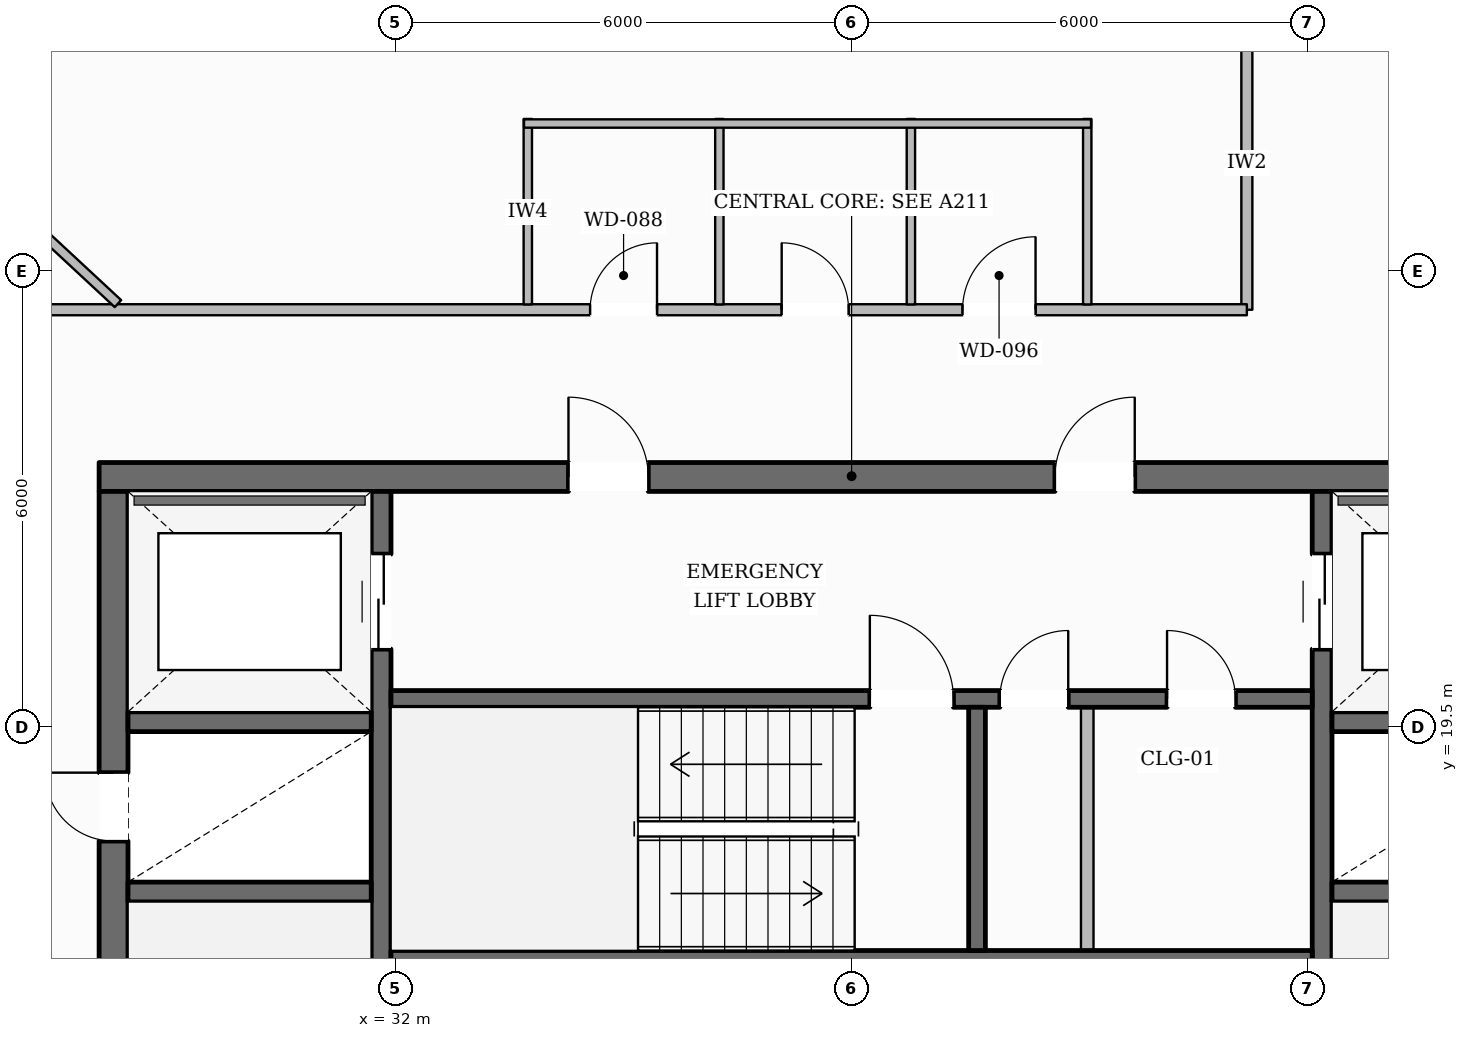
"""IFC4 building model, lengths in metres.
Left out: names, types, materials, properties, quantities, classifications, styles, units other than length and angle.
Written with IfcOpenShell. Run it as: python <this file> out.ifc"""

import sys

from ifc_helpers import new_model, si_unit, direction, frame, frame_2d, origin, place, context, subcontext, project, spatial, rectangle, extrude, element, fill, save


model = new_model("IFC4")
c1 = context("Model", 3, precision=1e-05, world=origin(), true_north=direction((0.0, 1.0)))
c2 = subcontext(c1, "Body", "Model", "MODEL_VIEW")
j1 = project(units=[si_unit("LENGTHUNIT", "METRE"), si_unit("PLANEANGLEUNIT", "RADIAN")], contexts=[c1])
p1 = place(None, origin())
s1 = spatial("IfcSite", under=j1, at=p1, CompositionType="ELEMENT")
p2 = place(p1, origin())
s2 = spatial("IfcBuilding", under=s1, at=p2, CompositionType="ELEMENT")
p3 = place(p2, frame((0.0, 0.0, 301.1)))
s3 = spatial("IfcBuildingStorey", under=s2, at=p3, CompositionType="ELEMENT", Elevation=301.1)
p4 = place(p3, frame((28.1, 22.79, 0.0), z_axis=(0.0, 0.0, 1.0), x_axis=(1.0, 0.0, 0.0)))
e1 = element("IfcWall", 1, at=p4, inside=s3, PredefinedType="SOLIDWALL", context=c2, shape_type="SweptSolid", body=[
    extrude(rectangle(XDim=19.8, YDim=0.38, at=frame_2d((9.9, 0.0))), origin(), (0.0, 0.0, 1.0), 3.635),
])
p5 = place(p4, frame((6.175, 0.0, 0.0)))
e2 = element("IfcOpeningElement", 2, at=p5, cuts=e1, PredefinedType="OPENING", context=c2, shape_type="SweptSolid", body=[
    extrude(rectangle(XDim=1.05, YDim=2.15, at=frame_2d((0.525, 1.075))), frame((0.0, 0.2, 0.0), z_axis=(0.0, -1.0, 0.0), x_axis=(1.0, 0.0, 0.0)), (0.0, 0.0, 1.0), 0.4),
])
p6 = place(p4, frame((12.575, 0.0, 0.0)))
e3 = element("IfcOpeningElement", 3, at=p6, cuts=e1, PredefinedType="OPENING", context=c2, shape_type="SweptSolid", body=[
    extrude(rectangle(XDim=1.05, YDim=2.15, at=frame_2d((0.525, 1.075))), frame((0.0, 0.2, 0.0), z_axis=(0.0, -1.0, 0.0), x_axis=(1.0, 0.0, 0.0)), (0.0, 0.0, 1.0), 0.4),
])
p7 = place(p3, frame((28.29, 9.6, 0.0), z_axis=(0.0, 0.0, 1.0), x_axis=(0.0, 1.0, 0.0)))
e4 = element("IfcWall", 4, at=p7, inside=s3, PredefinedType="SOLIDWALL", context=c2, shape_type="SweptSolid", body=[
    extrude(rectangle(XDim=13.0, YDim=0.38, at=frame_2d((6.5, 0.0))), origin(), (0.0, 0.0, 1.0), 3.635),
])
p8 = place(p7, frame((0.2, 0.0, 0.0)))
e5 = element("IfcOpeningElement", 5, at=p8, cuts=e4, PredefinedType="OPENING", context=c2, shape_type="SweptSolid", body=[
    extrude(rectangle(XDim=1.1, YDim=2.15, at=frame_2d((0.55, 1.075))), frame((0.0, 0.2, 0.0), z_axis=(0.0, -1.0, 0.0), x_axis=(1.0, 0.0, 0.0)), (0.0, 0.0, 1.0), 0.4),
])
p9 = place(p7, frame((8.4, 0.0, 0.0)))
e6 = element("IfcOpeningElement", 6, at=p9, cuts=e4, PredefinedType="OPENING", context=c2, shape_type="SweptSolid", body=[
    extrude(rectangle(XDim=0.9, YDim=2.1, at=frame_2d((0.45, 1.05))), frame((0.0, 0.2, 0.0), z_axis=(0.0, -1.0, 0.0), x_axis=(1.0, 0.0, 0.0)), (0.0, 0.0, 1.0), 0.4),
])
p10 = place(p3, frame((31.81, 9.6, 0.0), z_axis=(0.0, 0.0, 1.0), x_axis=(0.0, 1.0, 0.0)))
e7 = element("IfcWall", 7, at=p10, inside=s3, PredefinedType="SHEAR", context=c2, shape_type="SweptSolid", body=[
    extrude(rectangle(XDim=13.0, YDim=0.26, at=frame_2d((6.5, 0.0))), origin(), (0.0, 0.0, 1.0), 3.635),
])
p11 = place(p10, frame((10.925, 0.0, 0.0)))
e8 = element("IfcOpeningElement", 8, at=p11, cuts=e7, PredefinedType="OPENING", context=c2, shape_type="SweptSolid", body=[
    extrude(rectangle(XDim=1.25, YDim=2.25, at=frame_2d((0.625, 1.125))), frame((0.0, 0.14, 0.0), z_axis=(0.0, -1.0, 0.0), x_axis=(1.0, 0.0, 0.0)), (0.0, 0.0, 1.0), 0.28),
])
p12 = place(p3, frame((44.19, 9.6, 0.0), z_axis=(0.0, 0.0, 1.0), x_axis=(0.0, 1.0, 0.0)))
e9 = element("IfcWall", 9, at=p12, inside=s3, PredefinedType="SHEAR", context=c2, shape_type="SweptSolid", body=[
    extrude(rectangle(XDim=13.0, YDim=0.26, at=frame_2d((6.5, 0.0))), origin(), (0.0, 0.0, 1.0), 3.635),
])
p13 = place(p12, frame((10.925, 0.0, 0.0)))
e10 = element("IfcOpeningElement", 10, at=p13, cuts=e9, PredefinedType="OPENING", context=c2, shape_type="SweptSolid", body=[
    extrude(rectangle(XDim=1.25, YDim=2.25, at=frame_2d((0.625, 1.125))), frame((0.0, 0.14, 0.0), z_axis=(0.0, -1.0, 0.0), x_axis=(1.0, 0.0, 0.0)), (0.0, 0.0, 1.0), 0.28),
])
for number, where, z_axis, x_axis in (
    (11, (28.48, 17.33, 0.0), (0.0, 0.0, 1.0), (1.0, 0.0, 0.0)),
    (12, (28.48, 19.57, 0.0), (0.0, 0.0, 1.0), (1.0, 0.0, 0.0)),
    (13, (44.32, 17.33, 0.0), (0.0, 0.0, 1.0), (1.0, 0.0, 0.0)),
    (14, (44.32, 19.57, 0.0), (0.0, 0.0, 1.0), (1.0, 0.0, 0.0)),
):
    element("IfcWall", number, at=place(p3, frame(where, z_axis=z_axis, x_axis=x_axis)), inside=s3, PredefinedType="SHEAR", context=c2, shape_type="SweptSolid", body=[
        extrude(rectangle(XDim=3.2, YDim=0.26, at=frame_2d((1.6, 0.0))), origin(), (0.0, 0.0, 1.0), 3.635),
    ])
p14 = place(p3, frame((31.94, 19.87, 0.0), z_axis=(0.0, 0.0, 1.0), x_axis=(1.0, 0.0, 0.0)))
e15 = element("IfcWall", 15, at=p14, inside=s3, PredefinedType="SOLIDWALL", context=c2, shape_type="SweptSolid", body=[
    extrude(rectangle(XDim=12.12, YDim=0.22, at=frame_2d((6.06, 0.0))), origin(), (0.0, 0.0, 1.0), 3.635),
])
p15 = place(p14, frame((6.3, 0.0, 0.0)))
e16 = element("IfcOpeningElement", 16, at=p15, cuts=e15, PredefinedType="OPENING", context=c2, shape_type="SweptSolid", body=[
    extrude(rectangle(XDim=1.1, YDim=2.15, at=frame_2d((0.55, 1.075))), frame((0.0, 0.12, 0.0), z_axis=(0.0, -1.0, 0.0), x_axis=(1.0, 0.0, 0.0)), (0.0, 0.0, 1.0), 0.24),
])
p16 = place(p14, frame((8.01, 0.0, 0.0)))
e17 = element("IfcOpeningElement", 17, at=p16, cuts=e15, PredefinedType="OPENING", context=c2, shape_type="SweptSolid", body=[
    extrude(rectangle(XDim=0.9, YDim=2.1, at=frame_2d((0.45, 1.05))), frame((0.0, 0.12, 0.0), z_axis=(0.0, -1.0, 0.0), x_axis=(1.0, 0.0, 0.0)), (0.0, 0.0, 1.0), 0.24),
])
p17 = place(p14, frame((10.21, 0.0, 0.0)))
e18 = element("IfcOpeningElement", 18, at=p17, cuts=e15, PredefinedType="OPENING", context=c2, shape_type="SweptSolid", body=[
    extrude(rectangle(XDim=0.9, YDim=2.1, at=frame_2d((0.45, 1.05))), frame((0.0, 0.12, 0.0), z_axis=(0.0, -1.0, 0.0), x_axis=(1.0, 0.0, 0.0)), (0.0, 0.0, 1.0), 0.24),
])
p18 = place(p3, frame((31.94, 16.45, 0.0), z_axis=(0.0, 0.0, 1.0), x_axis=(1.0, 0.0, 0.0)))
e19 = element("IfcWall", 19, at=p18, inside=s3, PredefinedType="SOLIDWALL", context=c2, shape_type="SweptSolid", body=[
    extrude(rectangle(XDim=12.12, YDim=0.22, at=frame_2d((6.06, 0.0))), origin(), (0.0, 0.0, 1.0), 3.635),
])
p19 = place(p3, frame((39.65, 16.56, 0.0), z_axis=(0.0, 0.0, 1.0), x_axis=(0.0, 1.0, 0.0)))
e20 = element("IfcWall", 20, at=p19, inside=s3, PredefinedType="SOLIDWALL", context=c2, shape_type="SweptSolid", body=[
    extrude(rectangle(XDim=3.2, YDim=0.22, at=frame_2d((1.6, 0.0))), origin(), (0.0, 0.0, 1.0), 3.635),
])
p20 = place(p3, frame((15.771, 10.179, 0.0), z_axis=(0.0, 0.0, 1.0), x_axis=(0.493569993775, 0.869706077503, 0.0)))
e21 = element("IfcWall", 21, at=p20, inside=s3, PredefinedType="STANDARD", context=c2, shape_type="SweptSolid", body=[
    extrude(rectangle(XDim=39.897, YDim=0.35, at=frame_2d((19.949, 0.0))), origin(), (0.0, 0.0, 1.0), 3.221),
])
p21 = place(p20, frame((35.499, 0.0, 0.65)))
e22 = element("IfcOpeningElement", 22, at=p21, cuts=e21, PredefinedType="OPENING", context=c2, shape_type="SweptSolid", body=[
    extrude(rectangle(XDim=1.35, YDim=1.75, at=frame_2d((0.675, 0.875))), frame((0.0, 0.185, 0.0), z_axis=(0.0, -1.0, 0.0), x_axis=(1.0, 0.0, 0.0)), (0.0, 0.0, 1.0), 0.37),
])
p22 = place(p20, frame((29.007, 0.0, 0.65)))
e23 = element("IfcOpeningElement", 23, at=p22, cuts=e21, PredefinedType="OPENING", context=c2, shape_type="SweptSolid", body=[
    extrude(rectangle(XDim=1.35, YDim=1.75, at=frame_2d((0.675, 0.875))), frame((0.0, 0.185, 0.0), z_axis=(0.0, -1.0, 0.0), x_axis=(1.0, 0.0, 0.0)), (0.0, 0.0, 1.0), 0.37),
])
p23 = place(p20, frame((22.516, 0.0, 0.65)))
e24 = element("IfcOpeningElement", 24, at=p23, cuts=e21, PredefinedType="OPENING", context=c2, shape_type="SweptSolid", body=[
    extrude(rectangle(XDim=1.35, YDim=1.75, at=frame_2d((0.675, 0.875))), frame((0.0, 0.185, 0.0), z_axis=(0.0, -1.0, 0.0), x_axis=(1.0, 0.0, 0.0)), (0.0, 0.0, 1.0), 0.37),
])
p24 = place(p20, frame((9.533, 0.0, 0.65)))
e25 = element("IfcOpeningElement", 25, at=p24, cuts=e21, PredefinedType="OPENING", context=c2, shape_type="SweptSolid", body=[
    extrude(rectangle(XDim=1.35, YDim=1.75, at=frame_2d((0.675, 0.875))), frame((0.0, 0.185, 0.0), z_axis=(0.0, -1.0, 0.0), x_axis=(1.0, 0.0, 0.0)), (0.0, 0.0, 1.0), 0.37),
])
p25 = place(p20, frame((3.042, 0.0, 0.65)))
e26 = element("IfcOpeningElement", 26, at=p25, cuts=e21, PredefinedType="OPENING", context=c2, shape_type="SweptSolid", body=[
    extrude(rectangle(XDim=1.35, YDim=1.75, at=frame_2d((0.675, 0.875))), frame((0.0, 0.185, 0.0), z_axis=(0.0, -1.0, 0.0), x_axis=(1.0, 0.0, 0.0)), (0.0, 0.0, 1.0), 0.37),
])
p26 = place(p3, frame((40.491, 44.906, 0.0), z_axis=(0.0, 0.0, 1.0), x_axis=(0.489429021632, -0.872043136997, 0.0)))
e27 = element("IfcWall", 27, at=p26, inside=s3, PredefinedType="STANDARD", context=c2, shape_type="SweptSolid", body=[
    extrude(rectangle(XDim=39.581, YDim=0.35, at=frame_2d((19.79, 0.0))), origin(), (0.0, 0.0, 1.0), 3.221),
])
p27 = place(p26, frame((29.085, 0.0, 0.0)))
e28 = element("IfcOpeningElement", 28, at=p27, cuts=e27, PredefinedType="OPENING", context=c2, shape_type="SweptSolid", body=[
    extrude(rectangle(XDim=1.0, YDim=2.2, at=frame_2d((0.5, 1.1))), frame((0.0, 0.185, 0.0), z_axis=(0.0, -1.0, 0.0), x_axis=(1.0, 0.0, 0.0)), (0.0, 0.0, 1.0), 0.37),
])
p28 = place(p26, frame((35.216, 0.0, 0.65)))
e29 = element("IfcOpeningElement", 29, at=p28, cuts=e27, PredefinedType="OPENING", context=c2, shape_type="SweptSolid", body=[
    extrude(rectangle(XDim=1.35, YDim=1.75, at=frame_2d((0.675, 0.875))), frame((0.0, 0.185, 0.0), z_axis=(0.0, -1.0, 0.0), x_axis=(1.0, 0.0, 0.0)), (0.0, 0.0, 1.0), 0.37),
])
p29 = place(p26, frame((22.34, 0.0, 0.65)))
e30 = element("IfcOpeningElement", 30, at=p29, cuts=e27, PredefinedType="OPENING", context=c2, shape_type="SweptSolid", body=[
    extrude(rectangle(XDim=1.35, YDim=1.75, at=frame_2d((0.675, 0.875))), frame((0.0, 0.185, 0.0), z_axis=(0.0, -1.0, 0.0), x_axis=(1.0, 0.0, 0.0)), (0.0, 0.0, 1.0), 0.37),
])
p30 = place(p26, frame((9.464, 0.0, 0.65)))
e31 = element("IfcOpeningElement", 31, at=p30, cuts=e27, PredefinedType="OPENING", context=c2, shape_type="SweptSolid", body=[
    extrude(rectangle(XDim=1.35, YDim=1.75, at=frame_2d((0.675, 0.875))), frame((0.0, 0.185, 0.0), z_axis=(0.0, -1.0, 0.0), x_axis=(1.0, 0.0, 0.0)), (0.0, 0.0, 1.0), 0.37),
])
p31 = place(p26, frame((3.026, 0.0, 0.65)))
e32 = element("IfcOpeningElement", 32, at=p31, cuts=e27, PredefinedType="OPENING", context=c2, shape_type="SweptSolid", body=[
    extrude(rectangle(XDim=1.35, YDim=1.75, at=frame_2d((0.675, 0.875))), frame((0.0, 0.185, 0.0), z_axis=(0.0, -1.0, 0.0), x_axis=(1.0, 0.0, 0.0)), (0.0, 0.0, 1.0), 0.37),
])
p32 = place(p3, frame((41.1, 16.56, 0.0), z_axis=(0.0, 0.0, 1.0), x_axis=(0.0, 1.0, 0.0)))
e33 = element("IfcWall", 33, at=p32, inside=s3, PredefinedType="PARTITIONING", context=c2, shape_type="SweptSolid", body=[
    extrude(rectangle(XDim=3.2, YDim=0.165, at=frame_2d((1.6, 0.0))), origin(), (0.0, 0.0, 1.0), 3.635),
])
p33 = place(p3, frame((43.2, 24.99, 0.0), z_axis=(0.0, 0.0, 1.0), x_axis=(0.0, 1.0, 0.0)))
e34 = element("IfcWall", 34, at=p33, inside=s3, PredefinedType="PARTITIONING", context=c2, shape_type="SweptSolid", body=[
    extrude(rectangle(XDim=8.836, YDim=0.145, at=frame_2d((4.418, 0.0))), origin(), (0.0, 0.0, 1.0), 3.635),
])
p34 = place(p33, frame((4.105, 0.0, 0.0)))
e35 = element("IfcOpeningElement", 35, at=p34, cuts=e34, PredefinedType="OPENING", context=c2, shape_type="SweptSolid", body=[
    extrude(rectangle(XDim=1.4, YDim=2.2, at=frame_2d((0.7, 1.1))), frame((0.0, 0.083, 0.0), z_axis=(0.0, -1.0, 0.0), x_axis=(1.0, 0.0, 0.0)), (0.0, 0.0, 1.0), 0.165),
])
p35 = place(p3, frame((26.09, 24.99, 0.0), z_axis=(0.0, 0.0, 1.0), x_axis=(1.0, 0.0, 0.0)))
e36 = element("IfcWall", 36, at=p35, inside=s3, PredefinedType="PARTITIONING", context=c2, shape_type="SweptSolid", body=[
    extrude(rectangle(XDim=17.11, YDim=0.145, at=frame_2d((8.555, 0.0))), origin(), (0.0, 0.0, 1.0), 3.635),
])
p36 = place(p35, frame((8.47, 0.0, 0.0)))
e37 = element("IfcOpeningElement", 37, at=p36, cuts=e36, PredefinedType="OPENING", context=c2, shape_type="SweptSolid", body=[
    extrude(rectangle(XDim=0.88, YDim=2.1, at=frame_2d((0.44, 1.05))), frame((0.0, 0.083, 0.0), z_axis=(0.0, -1.0, 0.0), x_axis=(1.0, 0.0, 0.0)), (0.0, 0.0, 1.0), 0.165),
])
p37 = place(p35, frame((10.99, 0.0, 0.0)))
e38 = element("IfcOpeningElement", 38, at=p37, cuts=e36, PredefinedType="OPENING", context=c2, shape_type="SweptSolid", body=[
    extrude(rectangle(XDim=0.88, YDim=2.1, at=frame_2d((0.44, 1.05))), frame((0.0, 0.083, 0.0), z_axis=(0.0, -1.0, 0.0), x_axis=(1.0, 0.0, 0.0)), (0.0, 0.0, 1.0), 0.165),
])
p38 = place(p35, frame((13.37, 0.0, 0.0)))
e39 = element("IfcOpeningElement", 39, at=p38, cuts=e36, PredefinedType="OPENING", context=c2, shape_type="SweptSolid", body=[
    extrude(rectangle(XDim=0.96, YDim=2.1, at=frame_2d((0.48, 1.05))), frame((0.0, 0.083, 0.0), z_axis=(0.0, -1.0, 0.0), x_axis=(1.0, 0.0, 0.0)), (0.0, 0.0, 1.0), 0.165),
])
for number, where, z_axis, x_axis in (
    (40, (33.74, 25.06, 0.0), (0.0, 0.0, 1.0), (0.0, 1.0, 0.0)),
    (41, (36.26, 25.06, 0.0), (0.0, 0.0, 1.0), (0.0, 1.0, 0.0)),
    (42, (38.78, 25.06, 0.0), (0.0, 0.0, 1.0), (0.0, 1.0, 0.0)),
    (43, (41.1, 25.06, 0.0), (0.0, 0.0, 1.0), (0.0, 1.0, 0.0)),
):
    element("IfcWall", number, at=place(p3, frame(where, z_axis=z_axis, x_axis=x_axis)), inside=s3, PredefinedType="PLUMBINGWALL", context=c2, shape_type="SweptSolid", body=[
        extrude(rectangle(XDim=2.44, YDim=0.11, at=frame_2d((1.22, 0.0))), origin(), (0.0, 0.0, 1.0), 3.635),
    ])
p39 = place(p3, frame((33.69, 27.44, 0.0), z_axis=(0.0, 0.0, 1.0), x_axis=(1.0, 0.0, 0.0)))
e44 = element("IfcWall", 44, at=p39, inside=s3, PredefinedType="PLUMBINGWALL", context=c2, shape_type="SweptSolid", body=[
    extrude(rectangle(XDim=7.46, YDim=0.11, at=frame_2d((3.73, 0.0))), origin(), (0.0, 0.0, 1.0), 3.635),
])
p40 = place(p3, frame((28.348, 25.071, 0.0), z_axis=(0.0, 0.0, 1.0), x_axis=(-0.732493615347, 0.680773900407, 0.0)))
e45 = element("IfcWall", 45, at=p40, inside=s3, PredefinedType="PARTITIONING", context=c2, shape_type="SweptSolid", body=[
    extrude(rectangle(XDim=3.016, YDim=0.125, at=frame_2d((1.508, 0.0))), origin(), (0.0, 0.0, 1.0), 3.635),
])
p41 = place(p15, origin())
e46 = element("IfcDoor", 46, at=p41, inside=s3, OperationType="SINGLE_SWING_LEFT", PredefinedType="DOOR", context=c2, shape_type="SweptSolid", body=[
    extrude(rectangle(XDim=1.1, YDim=2.15, at=frame_2d((0.55, 1.075))), frame((0.0, 0.025, 0.0), z_axis=(0.0, -1.0, 0.0), x_axis=(1.0, 0.0, 0.0)), (0.0, 0.0, 1.0), 0.05),
])
fill(e16, e46)
p42 = place(p9, origin())
e47 = element("IfcDoor", 47, at=p42, inside=s3, OperationType="SINGLE_SWING_RIGHT", PredefinedType="DOOR", context=c2, shape_type="SweptSolid", body=[
    extrude(rectangle(XDim=0.9, YDim=2.1, at=frame_2d((0.45, 1.05))), frame((0.0, 0.025, 0.0), z_axis=(0.0, -1.0, 0.0), x_axis=(1.0, 0.0, 0.0)), (0.0, 0.0, 1.0), 0.05),
])
fill(e6, e47)
p43 = place(p5, origin())
e48 = element("IfcDoor", 48, at=p43, inside=s3, OperationType="SINGLE_SWING_LEFT", PredefinedType="DOOR", context=c2, shape_type="SweptSolid", body=[
    extrude(rectangle(XDim=1.05, YDim=2.15, at=frame_2d((0.525, 1.075))), frame((0.0, 0.025, 0.0), z_axis=(0.0, -1.0, 0.0), x_axis=(1.0, 0.0, 0.0)), (0.0, 0.0, 1.0), 0.05),
])
fill(e2, e48)
p44 = place(p6, origin())
e49 = element("IfcDoor", 49, at=p44, inside=s3, OperationType="SINGLE_SWING_RIGHT", PredefinedType="DOOR", context=c2, shape_type="SweptSolid", body=[
    extrude(rectangle(XDim=1.05, YDim=2.15, at=frame_2d((0.525, 1.075))), frame((0.0, 0.025, 0.0), z_axis=(0.0, -1.0, 0.0), x_axis=(1.0, 0.0, 0.0)), (0.0, 0.0, 1.0), 0.05),
])
fill(e3, e49)
p45 = place(p11, origin())
e50 = element("IfcDoor", 50, at=p45, inside=s3, OperationType="DOUBLE_DOOR_SLIDING", PredefinedType="DOOR", context=c2, shape_type="SweptSolid", body=[
    extrude(rectangle(XDim=1.25, YDim=2.25, at=frame_2d((0.625, 1.125))), frame((0.0, 0.025, 0.0), z_axis=(0.0, -1.0, 0.0), x_axis=(1.0, 0.0, 0.0)), (0.0, 0.0, 1.0), 0.05),
])
fill(e8, e50)
p46 = place(p13, origin())
e51 = element("IfcDoor", 51, at=p46, inside=s3, OperationType="DOUBLE_DOOR_SLIDING", PredefinedType="DOOR", context=c2, shape_type="SweptSolid", body=[
    extrude(rectangle(XDim=1.25, YDim=2.25, at=frame_2d((0.625, 1.125))), frame((0.0, 0.025, 0.0), z_axis=(0.0, -1.0, 0.0), x_axis=(1.0, 0.0, 0.0)), (0.0, 0.0, 1.0), 0.05),
])
fill(e10, e51)
p47 = place(p16, origin())
e52 = element("IfcDoor", 52, at=p47, inside=s3, OperationType="SINGLE_SWING_RIGHT", PredefinedType="DOOR", context=c2, shape_type="SweptSolid", body=[
    extrude(rectangle(XDim=0.9, YDim=2.1, at=frame_2d((0.45, 1.05))), frame((0.0, 0.025, 0.0), z_axis=(0.0, -1.0, 0.0), x_axis=(1.0, 0.0, 0.0)), (0.0, 0.0, 1.0), 0.05),
])
fill(e17, e52)
p48 = place(p17, origin())
e53 = element("IfcDoor", 53, at=p48, inside=s3, OperationType="SINGLE_SWING_LEFT", PredefinedType="DOOR", context=c2, shape_type="SweptSolid", body=[
    extrude(rectangle(XDim=0.9, YDim=2.1, at=frame_2d((0.45, 1.05))), frame((0.0, 0.025, 0.0), z_axis=(0.0, -1.0, 0.0), x_axis=(1.0, 0.0, 0.0)), (0.0, 0.0, 1.0), 0.05),
])
fill(e18, e53)
p49 = place(p36, origin())
e54 = element("IfcDoor", 54, at=p49, inside=s3, OperationType="SINGLE_SWING_RIGHT", PredefinedType="DOOR", context=c2, shape_type="SweptSolid", body=[
    extrude(rectangle(XDim=0.88, YDim=2.1, at=frame_2d((0.44, 1.05))), frame((0.0, 0.025, 0.0), z_axis=(0.0, -1.0, 0.0), x_axis=(1.0, 0.0, 0.0)), (0.0, 0.0, 1.0), 0.05),
])
fill(e37, e54)
p50 = place(p37, origin())
e55 = element("IfcDoor", 55, at=p50, inside=s3, OperationType="SINGLE_SWING_LEFT", PredefinedType="DOOR", context=c2, shape_type="SweptSolid", body=[
    extrude(rectangle(XDim=0.88, YDim=2.1, at=frame_2d((0.44, 1.05))), frame((0.0, 0.025, 0.0), z_axis=(0.0, -1.0, 0.0), x_axis=(1.0, 0.0, 0.0)), (0.0, 0.0, 1.0), 0.05),
])
fill(e38, e55)
p51 = place(p38, origin())
e56 = element("IfcDoor", 56, at=p51, inside=s3, OperationType="SINGLE_SWING_RIGHT", PredefinedType="DOOR", context=c2, shape_type="SweptSolid", body=[
    extrude(rectangle(XDim=0.96, YDim=2.1, at=frame_2d((0.48, 1.05))), frame((0.0, 0.025, 0.0), z_axis=(0.0, -1.0, 0.0), x_axis=(1.0, 0.0, 0.0)), (0.0, 0.0, 1.0), 0.05),
])
fill(e39, e56)
save(model, sys.argv[1])
